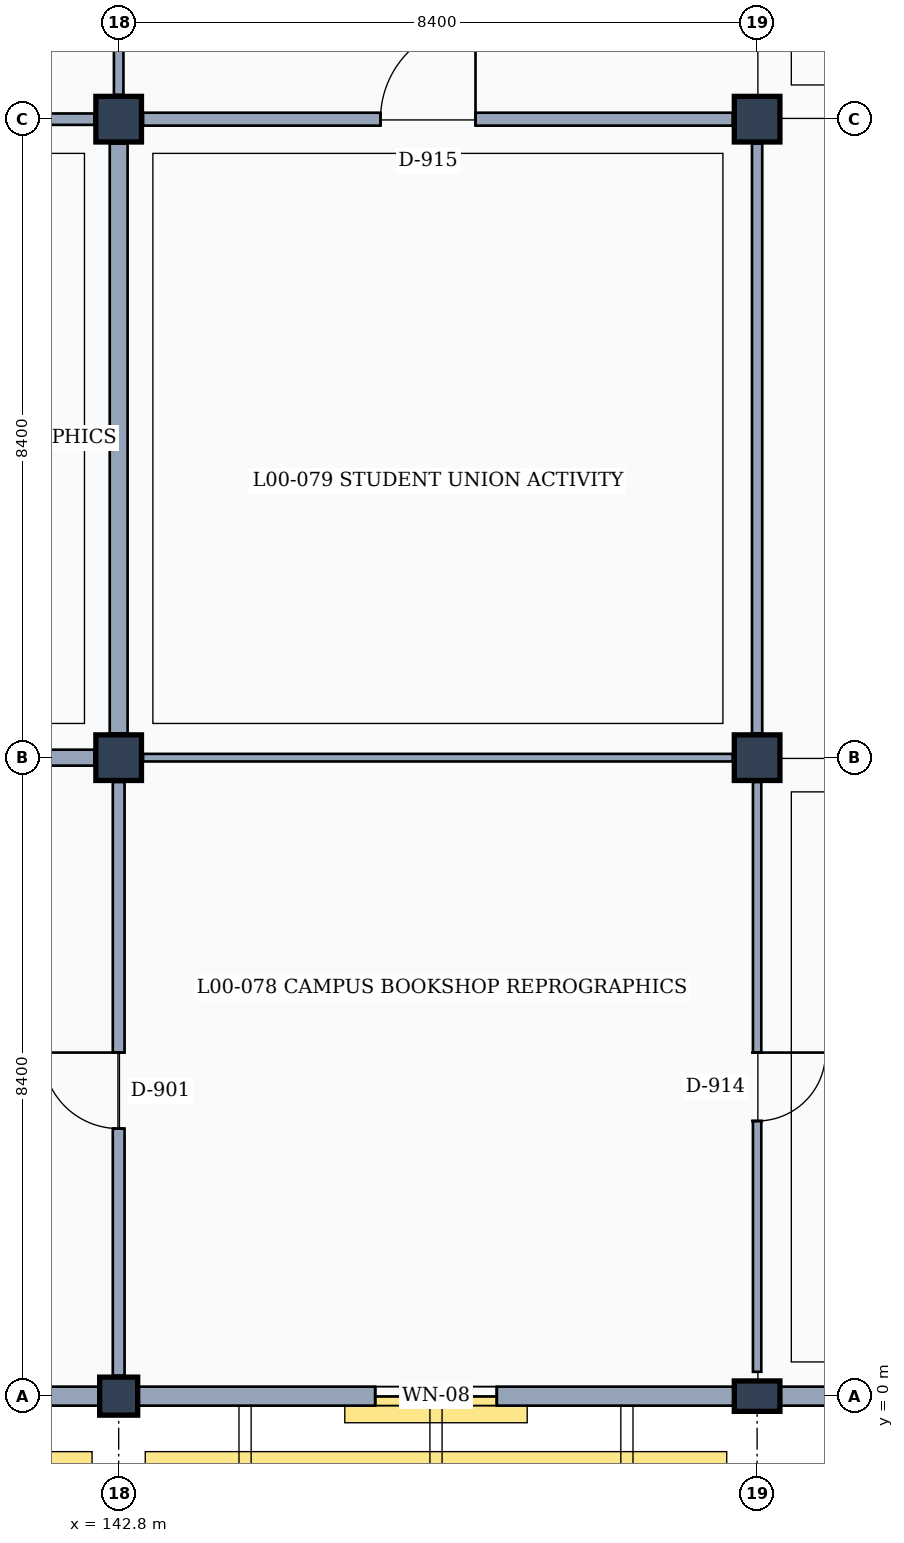
"""IFC4 building model, lengths in metres.
Left out: names, types, materials, properties, quantities, classifications, styles, units other than length and angle.
Written with IfcOpenShell. Run it as: python <this file> out.ifc"""

import sys

from ifc_helpers import new_model, si_unit, direction, frame, frame_2d, origin, origin_2d, place, context, subcontext, project, spatial, rectangle, extrude, element, fill, save


model = new_model("IFC4")
c1 = context("Model", 3, precision=1e-05, world=origin(), true_north=direction((0.0, 1.0)))
c2 = subcontext(c1, "Body", "Model", "MODEL_VIEW")
j1 = project(units=[si_unit("LENGTHUNIT", "METRE"), si_unit("PLANEANGLEUNIT", "RADIAN")], contexts=[c1])
p1 = place(None, origin())
s1 = spatial("IfcSite", under=j1, at=p1, CompositionType="ELEMENT")
p2 = place(p1, origin())
s2 = spatial("IfcBuilding", under=s1, at=p2, CompositionType="ELEMENT")
p3 = place(p2, origin())
s3 = spatial("IfcBuildingStorey", under=s2, at=p3, CompositionType="ELEMENT", Elevation=0.0)
p4 = place(p3, frame((142.8, 0.0, 0.0), z_axis=(0.0, 0.0, 1.0), x_axis=(1.0, 0.0, 0.0)))
e1 = element("IfcColumn", 1, at=p4, inside=s3, PredefinedType="COLUMN", context=c2, shape_type="SweptSolid", body=[
    extrude(rectangle(XDim=0.5, YDim=0.5, at=origin_2d()), origin(), (0.0, 0.0, 1.0), 4.8),
])
for number, where, z_axis, x_axis in (
    (2, (142.8, 8.4, 0.0), (0.0, 0.0, 1.0), (1.0, 0.0, 0.0)),
    (3, (142.8, 16.8, 0.0), (0.0, 0.0, 1.0), (1.0, 0.0, 0.0)),
):
    element("IfcColumn", number, at=place(p3, frame(where, z_axis=z_axis, x_axis=x_axis)), inside=s3, PredefinedType="COLUMN", context=c2, shape_type="SweptSolid", body=[
        extrude(rectangle(XDim=0.6, YDim=0.6, at=origin_2d()), origin(), (0.0, 0.0, 1.0), 4.8),
    ])
p5 = place(p3, frame((151.2, 0.0, 0.0), z_axis=(0.0, 0.0, 1.0), x_axis=(1.0, 0.0, 0.0)))
e4 = element("IfcColumn", 4, at=p5, inside=s3, PredefinedType="PILASTER", context=c2, shape_type="SweptSolid", body=[
    extrude(rectangle(XDim=0.6, YDim=0.4, at=origin_2d()), origin(), (0.0, 0.0, 1.0), 4.8),
])
for number, where, z_axis, x_axis in (
    (5, (151.2, 8.4, 0.0), (0.0, 0.0, 1.0), (1.0, 0.0, 0.0)),
    (6, (151.2, 16.8, 0.0), (0.0, 0.0, 1.0), (1.0, 0.0, 0.0)),
):
    element("IfcColumn", number, at=place(p3, frame(where, z_axis=z_axis, x_axis=x_axis)), inside=s3, PredefinedType="COLUMN", context=c2, shape_type="SweptSolid", body=[
        extrude(rectangle(XDim=0.6, YDim=0.6, at=origin_2d()), origin(), (0.0, 0.0, 1.0), 4.8),
    ])
p6 = place(p3, frame((142.55, 0.0, 0.0), z_axis=(0.0, 0.0, 1.0), x_axis=(-1.0, 0.0, 0.0)))
e7 = element("IfcWall", 7, at=p6, inside=s3, PredefinedType="SOLIDWALL", context=c2, shape_type="SweptSolid", body=[
    extrude(rectangle(XDim=7.9, YDim=0.25, at=frame_2d((3.95, 0.0))), origin(), (0.0, 0.0, 1.0), 3.96),
])
p7 = place(p6, frame((3.35, 0.0, 0.95)))
e8 = element("IfcOpeningElement", 8, at=p7, cuts=e7, PredefinedType="OPENING", context=c2, shape_type="SweptSolid", body=[
    extrude(rectangle(XDim=1.2, YDim=1.8, at=frame_2d((0.6, 0.9))), frame((0.0, 0.135, 0.0), z_axis=(0.0, -1.0, 0.0), x_axis=(1.0, 0.0, 0.0)), (0.0, 0.0, 1.0), 0.27),
])
p8 = place(p3, frame((150.9, 0.0, 0.0), z_axis=(0.0, 0.0, 1.0), x_axis=(-1.0, 0.0, 0.0)))
e9 = element("IfcWall", 9, at=p8, inside=s3, PredefinedType="SOLIDWALL", context=c2, shape_type="SweptSolid", body=[
    extrude(rectangle(XDim=7.85, YDim=0.25, at=frame_2d((3.925, 0.0))), origin(), (0.0, 0.0, 1.0), 3.96),
])
p9 = place(p8, frame((3.125, 0.0, 0.95)))
e10 = element("IfcOpeningElement", 10, at=p9, cuts=e9, PredefinedType="OPENING", context=c2, shape_type="SweptSolid", body=[
    extrude(rectangle(XDim=1.6, YDim=2.0, at=frame_2d((0.8, 1.0))), frame((0.0, 0.135, 0.0), z_axis=(0.0, -1.0, 0.0), x_axis=(1.0, 0.0, 0.0)), (0.0, 0.0, 1.0), 0.27),
])
p10 = place(p3, frame((159.35, 0.0, 0.0), z_axis=(0.0, 0.0, 1.0), x_axis=(-1.0, 0.0, 0.0)))
e11 = element("IfcWall", 11, at=p10, inside=s3, PredefinedType="SOLIDWALL", context=c2, shape_type="SweptSolid", body=[
    extrude(rectangle(XDim=7.85, YDim=0.25, at=frame_2d((3.925, 0.0))), origin(), (0.0, 0.0, 1.0), 3.96),
])
p11 = place(p10, frame((3.025, 0.0, 0.0)))
e12 = element("IfcOpeningElement", 12, at=p11, cuts=e11, PredefinedType="OPENING", context=c2, shape_type="SweptSolid", body=[
    extrude(rectangle(XDim=1.8, YDim=2.2, at=frame_2d((0.9, 1.1))), frame((0.0, 0.135, 0.0), z_axis=(0.0, -1.0, 0.0), x_axis=(1.0, 0.0, 0.0)), (0.0, 0.0, 1.0), 0.27),
])
p12 = place(p3, frame((142.8, 0.27, 0.0), z_axis=(0.0, 0.0, 1.0), x_axis=(0.0, 1.0, 0.0)))
e13 = element("IfcWall", 13, at=p12, inside=s3, PredefinedType="PARTITIONING", context=c2, shape_type="SweptSolid", body=[
    extrude(rectangle(XDim=7.81, YDim=0.155, at=frame_2d((3.905, 0.0))), origin(), (0.0, 0.0, 1.0), 3.92),
])
p13 = place(p12, frame((3.25, 0.0, 0.0)))
e14 = element("IfcOpeningElement", 14, at=p13, cuts=e13, PredefinedType="OPENING", context=c2, shape_type="SweptSolid", body=[
    extrude(rectangle(XDim=1.0, YDim=2.15, at=frame_2d((0.5, 1.075))), frame((0.0, 0.087, 0.0), z_axis=(0.0, -1.0, 0.0), x_axis=(1.0, 0.0, 0.0)), (0.0, 0.0, 1.0), 0.175),
])
p14 = place(p3, frame((134.72, 8.4, 0.0), z_axis=(0.0, 0.0, 1.0), x_axis=(1.0, 0.0, 0.0)))
e15 = element("IfcWall", 15, at=p14, inside=s3, PredefinedType="PARTITIONING", context=c2, shape_type="SweptSolid", body=[
    extrude(rectangle(XDim=7.76, YDim=0.21, at=frame_2d((3.88, 0.0))), origin(), (0.0, 0.0, 1.0), 3.87),
])
p15 = place(p3, frame((142.8, 8.72, 0.0), z_axis=(0.0, 0.0, 1.0), x_axis=(0.0, 1.0, 0.0)))
e16 = element("IfcWall", 16, at=p15, inside=s3, PredefinedType="PARTITIONING", context=c2, shape_type="SweptSolid", body=[
    extrude(rectangle(XDim=7.76, YDim=0.235, at=frame_2d((3.88, 0.0))), origin(), (0.0, 0.0, 1.0), 3.92),
])
p16 = place(p3, frame((134.72, 16.8, 0.0), z_axis=(0.0, 0.0, 1.0), x_axis=(1.0, 0.0, 0.0)))
e17 = element("IfcWall", 17, at=p16, inside=s3, PredefinedType="PARTITIONING", context=c2, shape_type="SweptSolid", body=[
    extrude(rectangle(XDim=7.76, YDim=0.15, at=frame_2d((3.88, 0.0))), origin(), (0.0, 0.0, 1.0), 3.87),
])
p17 = place(p16, frame((3.275, 0.0, 0.0)))
e18 = element("IfcOpeningElement", 18, at=p17, cuts=e17, PredefinedType="OPENING", context=c2, shape_type="SweptSolid", body=[
    extrude(rectangle(XDim=0.95, YDim=2.15, at=frame_2d((0.475, 1.075))), frame((0.0, 0.085, 0.0), z_axis=(0.0, -1.0, 0.0), x_axis=(1.0, 0.0, 0.0)), (0.0, 0.0, 1.0), 0.17),
])
p18 = place(p3, frame((142.8, 17.12, 0.0), z_axis=(0.0, 0.0, 1.0), x_axis=(0.0, 1.0, 0.0)))
e19 = element("IfcWall", 19, at=p18, inside=s3, PredefinedType="PARTITIONING", context=c2, shape_type="SweptSolid", body=[
    extrude(rectangle(XDim=7.76, YDim=0.125, at=frame_2d((3.88, 0.0))), origin(), (0.0, 0.0, 1.0), 3.92),
])
p19 = place(p3, frame((151.2, 0.32, 0.0), z_axis=(0.0, 0.0, 1.0), x_axis=(0.0, 1.0, 0.0)))
e20 = element("IfcWall", 20, at=p19, inside=s3, PredefinedType="PARTITIONING", context=c2, shape_type="SweptSolid", body=[
    extrude(rectangle(XDim=7.76, YDim=0.11, at=frame_2d((3.88, 0.0))), origin(), (0.0, 0.0, 1.0), 3.92),
])
p20 = place(p19, frame((3.3, 0.0, 0.0)))
e21 = element("IfcOpeningElement", 21, at=p20, cuts=e20, PredefinedType="OPENING", context=c2, shape_type="SweptSolid", body=[
    extrude(rectangle(XDim=0.9, YDim=2.1, at=frame_2d((0.45, 1.05))), frame((0.0, 0.065, 0.0), z_axis=(0.0, -1.0, 0.0), x_axis=(1.0, 0.0, 0.0)), (0.0, 0.0, 1.0), 0.13),
])
p21 = place(p3, frame((143.12, 8.4, 0.0), z_axis=(0.0, 0.0, 1.0), x_axis=(1.0, 0.0, 0.0)))
e22 = element("IfcWall", 22, at=p21, inside=s3, PredefinedType="MOVABLE", context=c2, shape_type="SweptSolid", body=[
    extrude(rectangle(XDim=7.76, YDim=0.1, at=frame_2d((3.88, 0.0))), origin(), (0.0, 0.0, 1.0), 3.87),
])
p22 = place(p3, frame((151.2, 8.72, 0.0), z_axis=(0.0, 0.0, 1.0), x_axis=(0.0, 1.0, 0.0)))
e23 = element("IfcWall", 23, at=p22, inside=s3, PredefinedType="PARTITIONING", context=c2, shape_type="SweptSolid", body=[
    extrude(rectangle(XDim=7.76, YDim=0.135, at=frame_2d((3.88, 0.0))), origin(), (0.0, 0.0, 1.0), 3.92),
])
p23 = place(p3, frame((143.12, 16.8, 0.0), z_axis=(0.0, 0.0, 1.0), x_axis=(1.0, 0.0, 0.0)))
e24 = element("IfcWall", 24, at=p23, inside=s3, PredefinedType="PARTITIONING", context=c2, shape_type="SweptSolid", body=[
    extrude(rectangle(XDim=7.76, YDim=0.17, at=frame_2d((3.88, 0.0))), origin(), (0.0, 0.0, 1.0), 3.87),
])
p24 = place(p23, frame((3.125, 0.0, 0.0)))
e25 = element("IfcOpeningElement", 25, at=p24, cuts=e24, PredefinedType="OPENING", context=c2, shape_type="SweptSolid", body=[
    extrude(rectangle(XDim=1.25, YDim=2.3, at=frame_2d((0.625, 1.15))), frame((0.0, 0.095, 0.0), z_axis=(0.0, -1.0, 0.0), x_axis=(1.0, 0.0, 0.0)), (0.0, 0.0, 1.0), 0.19),
])
p25 = place(p9, origin())
e26 = element("IfcWindow", 26, at=p25, inside=s3, PartitioningType="SINGLE_PANEL", PredefinedType="WINDOW", context=c2, shape_type="SweptSolid", body=[
    extrude(rectangle(XDim=1.6, YDim=2.0, at=frame_2d((0.8, 1.0))), frame((0.0, 0.03, 0.0), z_axis=(0.0, -1.0, 0.0), x_axis=(1.0, 0.0, 0.0)), (0.0, 0.0, 1.0), 0.06),
])
fill(e10, e26)
p26 = place(p13, origin())
e27 = element("IfcDoor", 27, at=p26, inside=s3, OperationType="SINGLE_SWING_RIGHT", PredefinedType="DOOR", context=c2, shape_type="SweptSolid", body=[
    extrude(rectangle(XDim=1.0, YDim=2.15, at=frame_2d((0.5, 1.075))), frame((0.0, 0.025, 0.0), z_axis=(0.0, -1.0, 0.0), x_axis=(1.0, 0.0, 0.0)), (0.0, 0.0, 1.0), 0.05),
])
fill(e14, e27)
p27 = place(p20, frame((0.9, 0.0, 0.0), z_axis=(0.0, 0.0, 1.0), x_axis=(-1.0, 0.0, 0.0)))
e28 = element("IfcDoor", 28, at=p27, inside=s3, OperationType="SINGLE_SWING_LEFT", PredefinedType="DOOR", context=c2, shape_type="SweptSolid", body=[
    extrude(rectangle(XDim=0.9, YDim=2.1, at=frame_2d((0.45, 1.05))), frame((0.0, 0.025, 0.0), z_axis=(0.0, -1.0, 0.0), x_axis=(1.0, 0.0, 0.0)), (0.0, 0.0, 1.0), 0.05),
])
fill(e21, e28)
p28 = place(p24, origin())
e29 = element("IfcDoor", 29, at=p28, inside=s3, OperationType="SINGLE_SWING_RIGHT", PredefinedType="DOOR", context=c2, shape_type="SweptSolid", body=[
    extrude(rectangle(XDim=1.25, YDim=2.3, at=frame_2d((0.625, 1.15))), frame((0.0, 0.025, 0.0), z_axis=(0.0, -1.0, 0.0), x_axis=(1.0, 0.0, 0.0)), (0.0, 0.0, 1.0), 0.05),
])
fill(e25, e29)
save(model, sys.argv[1])
